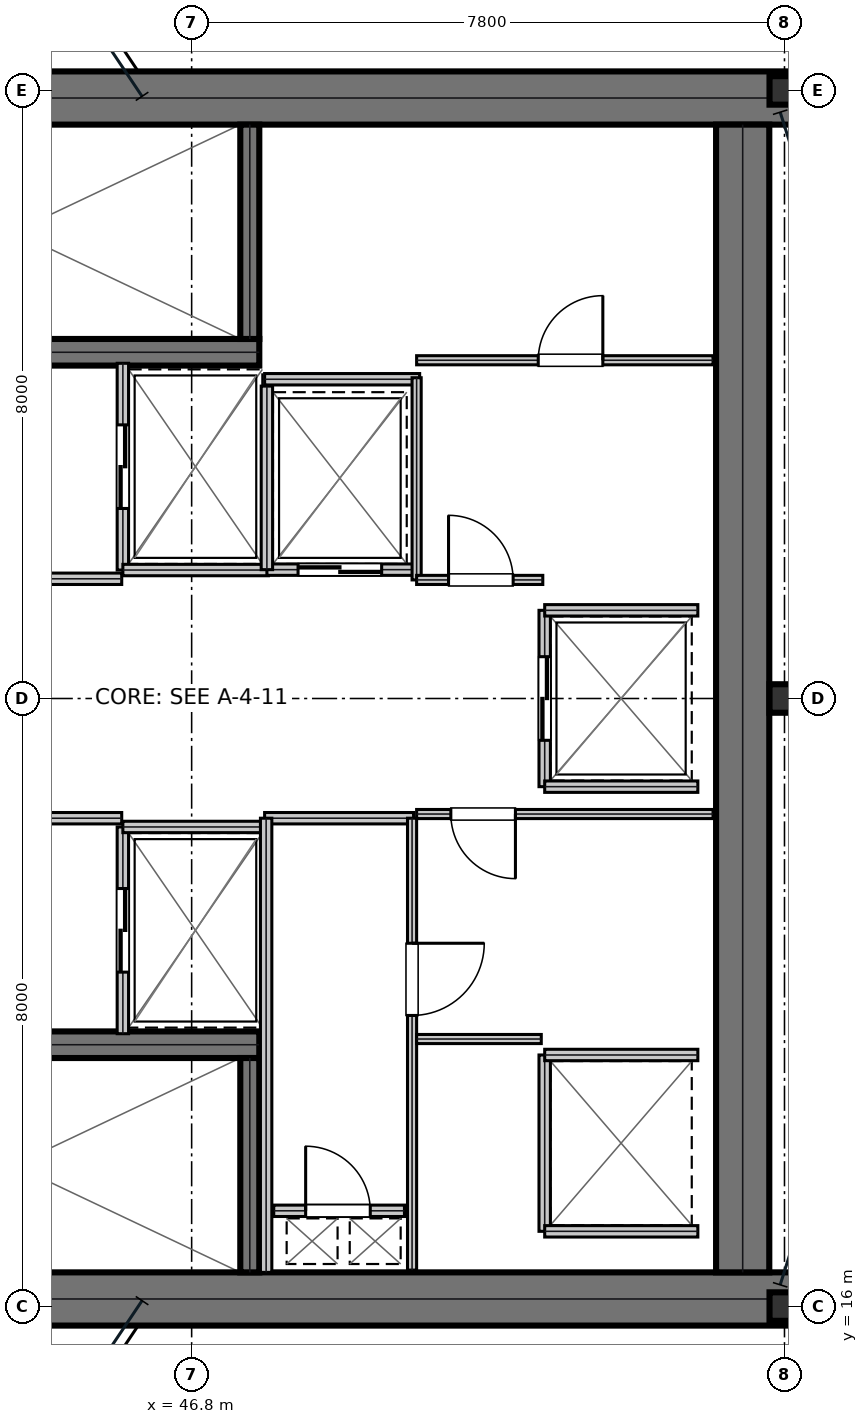
"""IFC4 building model, lengths in metres.
Left out: names, types, materials, properties, quantities, classifications, styles, units other than length and angle.
Written with IfcOpenShell. Run it as: python <this file> out.ifc"""

import sys

from ifc_helpers import new_model, si_unit, direction, frame, frame_2d, origin, origin_2d, place, context, subcontext, project, spatial, rectangle, i_section, extrude, element, fill, save


model = new_model("IFC4")
c1 = context("Model", 3, precision=1e-05, world=origin(), true_north=direction((0.0, 1.0)))
c2 = subcontext(c1, "Body", "Model", "MODEL_VIEW")
j1 = project(units=[si_unit("LENGTHUNIT", "METRE"), si_unit("PLANEANGLEUNIT", "RADIAN")], contexts=[c1])
p1 = place(None, origin())
s1 = spatial("IfcSite", under=j1, at=p1, CompositionType="ELEMENT")
p2 = place(p1, origin())
s2 = spatial("IfcBuilding", under=s1, at=p2, CompositionType="ELEMENT")
p3 = place(p2, frame((0.0, 0.0, 212.1)))
s3 = spatial("IfcBuildingStorey", under=s2, at=p3, CompositionType="ELEMENT", Elevation=212.1)
for number, where, z_axis, x_axis in (
    (1, (38.8, 31.9, 0.0), (0.0, 0.0, 1.0), (1.0, 0.0, 0.0)),
    (2, (38.8, 16.1, 0.0), (0.0, 0.0, 1.0), (1.0, 0.0, 0.0)),
):
    element("IfcWall", number, at=place(p3, frame(where, z_axis=z_axis, x_axis=x_axis)), inside=s3, PredefinedType="SHEAR", context=c2, shape_type="SweptSolid", body=[
        extrude(rectangle(XDim=16.0, YDim=0.7, at=frame_2d((8.0, 0.0))), origin(), (0.0, 0.0, 1.0), 3.79),
    ])
p4 = place(p3, frame((54.05, 16.45, 0.0), z_axis=(0.0, 0.0, 1.0), x_axis=(0.0, 1.0, 0.0)))
e3 = element("IfcWall", 3, at=p4, inside=s3, PredefinedType="SHEAR", context=c2, shape_type="SweptSolid", body=[
    extrude(rectangle(XDim=15.1, YDim=0.7, at=frame_2d((7.55, 0.0))), origin(), (0.0, 0.0, 1.0), 3.79),
])
p5 = place(p3, frame((39.98, 28.555, 0.0), z_axis=(0.0, 0.0, 1.0), x_axis=(1.0, 0.0, 0.0)))
e4 = element("IfcWall", 4, at=p5, inside=s3, PredefinedType="SHEAR", context=c2, shape_type="SweptSolid", body=[
    extrude(rectangle(XDim=7.71, YDim=0.35, at=frame_2d((3.855, 0.0))), origin(), (0.0, 0.0, 1.0), 3.79),
])
p6 = place(p5, frame((0.25, 0.0, 0.0)))
e5 = element("IfcOpeningElement", 5, at=p6, cuts=e4, PredefinedType="OPENING", context=c2, shape_type="SweptSolid", body=[
    extrude(rectangle(XDim=1.1, YDim=2.15, at=frame_2d((0.55, 1.075))), frame((0.0, 0.185, 0.0), z_axis=(0.0, -1.0, 0.0), x_axis=(1.0, 0.0, 0.0)), (0.0, 0.0, 1.0), 0.37),
])
p7 = place(p3, frame((39.98, 19.445, 0.0), z_axis=(0.0, 0.0, 1.0), x_axis=(1.0, 0.0, 0.0)))
e6 = element("IfcWall", 6, at=p7, inside=s3, PredefinedType="SHEAR", context=c2, shape_type="SweptSolid", body=[
    extrude(rectangle(XDim=7.71, YDim=0.35, at=frame_2d((3.855, 0.0))), origin(), (0.0, 0.0, 1.0), 3.79),
])
p8 = place(p7, frame((0.25, 0.0, 0.0)))
e7 = element("IfcOpeningElement", 7, at=p8, cuts=e6, PredefinedType="OPENING", context=c2, shape_type="SweptSolid", body=[
    extrude(rectangle(XDim=1.1, YDim=2.15, at=frame_2d((0.55, 1.075))), frame((0.0, 0.185, 0.0), z_axis=(0.0, -1.0, 0.0), x_axis=(1.0, 0.0, 0.0)), (0.0, 0.0, 1.0), 0.37),
])
for number, where, z_axis, x_axis in (
    (8, (47.565, 28.73, 0.0), (0.0, 0.0, 1.0), (0.0, 1.0, 0.0)),
    (9, (47.565, 16.45, 0.0), (0.0, 0.0, 1.0), (0.0, 1.0, 0.0)),
):
    element("IfcWall", number, at=place(p3, frame(where, z_axis=z_axis, x_axis=x_axis)), inside=s3, PredefinedType="SHEAR", context=c2, shape_type="SweptSolid", body=[
        extrude(rectangle(XDim=2.82, YDim=0.25, at=frame_2d((1.41, 0.0))), origin(), (0.0, 0.0, 1.0), 3.79),
    ])
for number, where, z_axis, x_axis in (
    (10, (54.6, 16.0, 0.0), (0.0, 0.0, 1.0), (1.0, 0.0, 0.0)),
    (11, (54.6, 24.0, 0.0), (0.0, 0.0, 1.0), (1.0, 0.0, 0.0)),
    (12, (54.6, 32.0, 0.0), (0.0, 0.0, 1.0), (1.0, 0.0, 0.0)),
):
    element("IfcColumn", number, at=place(p3, frame(where, z_axis=z_axis, x_axis=x_axis)), inside=s3, PredefinedType="COLUMN", context=c2, shape_type="SweptSolid", body=[
        extrude(i_section(OverallWidth=0.394, OverallDepth=0.375, WebThickness=0.017, FlangeThickness=0.028, at=origin_2d()), origin(), (0.0, 0.0, 1.0), 4.044),
    ])
p9 = place(p3, frame((39.98, 25.575, 0.0), z_axis=(0.0, 0.0, 1.0), x_axis=(1.0, 0.0, 0.0)))
e13 = element("IfcWall", 13, at=p9, inside=s3, PredefinedType="PARTITIONING", context=c2, shape_type="SweptSolid", body=[
    extrude(rectangle(XDim=5.9, YDim=0.15, at=frame_2d((2.95, 0.0))), origin(), (0.0, 0.0, 1.0), 3.79),
])
p10 = place(p9, frame((2.35, 0.0, 0.0)))
e14 = element("IfcOpeningElement", 14, at=p10, cuts=e13, PredefinedType="OPENING", context=c2, shape_type="SweptSolid", body=[
    extrude(rectangle(XDim=1.05, YDim=2.15, at=frame_2d((0.525, 1.075))), frame((0.0, 0.085, 0.0), z_axis=(0.0, -1.0, 0.0), x_axis=(1.0, 0.0, 0.0)), (0.0, 0.0, 1.0), 0.17),
])
p11 = place(p3, frame((39.98, 22.425, 0.0), z_axis=(0.0, 0.0, 1.0), x_axis=(1.0, 0.0, 0.0)))
e15 = element("IfcWall", 15, at=p11, inside=s3, PredefinedType="PARTITIONING", context=c2, shape_type="SweptSolid", body=[
    extrude(rectangle(XDim=5.9, YDim=0.15, at=frame_2d((2.95, 0.0))), origin(), (0.0, 0.0, 1.0), 3.79),
])
p12 = place(p11, frame((2.35, 0.0, 0.0)))
e16 = element("IfcOpeningElement", 16, at=p12, cuts=e15, PredefinedType="OPENING", context=c2, shape_type="SweptSolid", body=[
    extrude(rectangle(XDim=1.05, YDim=2.15, at=frame_2d((0.525, 1.075))), frame((0.0, 0.085, 0.0), z_axis=(0.0, -1.0, 0.0), x_axis=(1.0, 0.0, 0.0)), (0.0, 0.0, 1.0), 0.17),
])
p13 = place(p3, frame((45.895, 25.69, 0.0), z_axis=(0.0, 0.0, 1.0), x_axis=(0.0, 1.0, 0.0)))
e17 = element("IfcWall", 17, at=p13, inside=s3, PredefinedType="PARTITIONING", context=c2, shape_type="SweptSolid", body=[
    extrude(rectangle(XDim=2.72, YDim=0.15, at=frame_2d((1.36, 0.0))), origin(), (0.0, 0.0, 1.0), 3.79),
])
p14 = place(p13, frame((0.81, 0.0, 0.0)))
e18 = element("IfcOpeningElement", 18, at=p14, cuts=e17, PredefinedType="OPENING", context=c2, shape_type="SweptSolid", body=[
    extrude(rectangle(XDim=1.1, YDim=2.15, at=frame_2d((0.55, 1.075))), frame((0.0, 0.085, 0.0), z_axis=(0.0, -1.0, 0.0), x_axis=(1.0, 0.0, 0.0)), (0.0, 0.0, 1.0), 0.17),
])
p15 = place(p3, frame((45.895, 25.69, 0.0), z_axis=(0.0, 0.0, 1.0), x_axis=(1.0, 0.0, 0.0)))
e19 = element("IfcWall", 19, at=p15, inside=s3, PredefinedType="PARTITIONING", context=c2, shape_type="SweptSolid", body=[
    extrude(rectangle(XDim=1.915, YDim=0.15, at=frame_2d((0.958, 0.0))), origin(), (0.0, 0.0, 1.0), 3.79),
])
p16 = place(p3, frame((45.895, 19.59, 0.0), z_axis=(0.0, 0.0, 1.0), x_axis=(0.0, 1.0, 0.0)))
e20 = element("IfcWall", 20, at=p16, inside=s3, PredefinedType="PARTITIONING", context=c2, shape_type="SweptSolid", body=[
    extrude(rectangle(XDim=2.72, YDim=0.15, at=frame_2d((1.36, 0.0))), origin(), (0.0, 0.0, 1.0), 3.79),
])
p17 = place(p16, frame((0.81, 0.0, 0.0)))
e21 = element("IfcOpeningElement", 21, at=p17, cuts=e20, PredefinedType="OPENING", context=c2, shape_type="SweptSolid", body=[
    extrude(rectangle(XDim=1.1, YDim=2.15, at=frame_2d((0.55, 1.075))), frame((0.0, 0.085, 0.0), z_axis=(0.0, -1.0, 0.0), x_axis=(1.0, 0.0, 0.0)), (0.0, 0.0, 1.0), 0.17),
])
p18 = place(p3, frame((45.895, 22.31, 0.0), z_axis=(0.0, 0.0, 1.0), x_axis=(1.0, 0.0, 0.0)))
e22 = element("IfcWall", 22, at=p18, inside=s3, PredefinedType="PARTITIONING", context=c2, shape_type="SweptSolid", body=[
    extrude(rectangle(XDim=1.915, YDim=0.15, at=frame_2d((0.958, 0.0))), origin(), (0.0, 0.0, 1.0), 3.79),
])
p19 = place(p3, frame((47.79, 25.695, 0.0), z_axis=(0.0, 0.0, 1.0), x_axis=(1.0, 0.0, 0.0)))
e23 = element("IfcWall", 23, at=p19, inside=s3, PredefinedType="PARTITIONING", context=c2, shape_type="SweptSolid", body=[
    extrude(rectangle(XDim=1.92, YDim=0.15, at=frame_2d((0.96, 0.0))), origin(), (0.0, 0.0, 1.0), 3.79),
])
p20 = place(p19, frame((0.41, 0.0, 0.0)))
e24 = element("IfcOpeningElement", 24, at=p20, cuts=e23, PredefinedType="OPENING", context=c2, shape_type="SweptSolid", body=[
    extrude(rectangle(XDim=1.1, YDim=2.15, at=frame_2d((0.55, 1.075))), frame((0.0, 0.085, 0.0), z_axis=(0.0, -1.0, 0.0), x_axis=(1.0, 0.0, 0.0)), (0.0, 0.0, 1.0), 0.17),
])
p21 = place(p3, frame((47.79, 25.695, 0.0), z_axis=(0.0, 0.0, 1.0), x_axis=(0.0, 1.0, 0.0)))
e25 = element("IfcWall", 25, at=p21, inside=s3, PredefinedType="PARTITIONING", context=c2, shape_type="SweptSolid", body=[
    extrude(rectangle(XDim=2.415, YDim=0.15, at=frame_2d((1.208, 0.0))), origin(), (0.0, 0.0, 1.0), 3.79),
])
p22 = place(p3, frame((51.445, 22.84, 0.0), z_axis=(0.0, 0.0, 1.0), x_axis=(0.0, 1.0, 0.0)))
e26 = element("IfcWall", 26, at=p22, inside=s3, PredefinedType="PARTITIONING", context=c2, shape_type="SweptSolid", body=[
    extrude(rectangle(XDim=2.32, YDim=0.15, at=frame_2d((1.16, 0.0))), origin(), (0.0, 0.0, 1.0), 3.79),
])
p23 = place(p22, frame((0.61, 0.0, 0.0)))
e27 = element("IfcOpeningElement", 27, at=p23, cuts=e26, PredefinedType="OPENING", context=c2, shape_type="SweptSolid", body=[
    extrude(rectangle(XDim=1.1, YDim=2.15, at=frame_2d((0.55, 1.075))), frame((0.0, 0.085, 0.0), z_axis=(0.0, -1.0, 0.0), x_axis=(1.0, 0.0, 0.0)), (0.0, 0.0, 1.0), 0.17),
])
for number, where, z_axis, x_axis in (
    (28, (51.445, 22.84, 0.0), (0.0, 0.0, 1.0), (1.0, 0.0, 0.0)),
    (29, (51.445, 25.16, 0.0), (0.0, 0.0, 1.0), (1.0, 0.0, 0.0)),
):
    element("IfcWall", number, at=place(p3, frame(where, z_axis=z_axis, x_axis=x_axis)), inside=s3, PredefinedType="PARTITIONING", context=c2, shape_type="SweptSolid", body=[
        extrude(rectangle(XDim=2.015, YDim=0.15, at=frame_2d((1.007, 0.0))), origin(), (0.0, 0.0, 1.0), 3.79),
    ])
p24 = place(p3, frame((51.445, 16.99, 0.0), z_axis=(0.0, 0.0, 1.0), x_axis=(0.0, 1.0, 0.0)))
e30 = element("IfcWall", 30, at=p24, inside=s3, PredefinedType="PARTITIONING", context=c2, shape_type="SweptSolid", body=[
    extrude(rectangle(XDim=2.32, YDim=0.15, at=frame_2d((1.16, 0.0))), origin(), (0.0, 0.0, 1.0), 3.79),
])
for number, where, z_axis, x_axis in (
    (31, (51.445, 16.99, 0.0), (0.0, 0.0, 1.0), (1.0, 0.0, 0.0)),
    (32, (51.445, 19.31, 0.0), (0.0, 0.0, 1.0), (1.0, 0.0, 0.0)),
):
    element("IfcWall", number, at=place(p3, frame(where, z_axis=z_axis, x_axis=x_axis)), inside=s3, PredefinedType="PARTITIONING", context=c2, shape_type="SweptSolid", body=[
        extrude(rectangle(XDim=2.015, YDim=0.15, at=frame_2d((1.007, 0.0))), origin(), (0.0, 0.0, 1.0), 3.79),
    ])
p25 = place(p3, frame((47.88, 17.26, 0.0), z_axis=(0.0, 0.0, 1.0), x_axis=(1.0, 0.0, 0.0)))
e33 = element("IfcWall", 33, at=p25, inside=s3, PredefinedType="PARTITIONING", context=c2, shape_type="SweptSolid", body=[
    extrude(rectangle(XDim=1.72, YDim=0.15, at=frame_2d((0.86, 0.0))), origin(), (0.0, 0.0, 1.0), 3.79),
])
p26 = place(p25, frame((0.42, 0.0, 0.0)))
e34 = element("IfcOpeningElement", 34, at=p26, cuts=e33, PredefinedType="OPENING", context=c2, shape_type="SweptSolid", body=[
    extrude(rectangle(XDim=0.85, YDim=2.15, at=frame_2d((0.425, 1.075))), frame((0.0, 0.085, 0.0), z_axis=(0.0, -1.0, 0.0), x_axis=(1.0, 0.0, 0.0)), (0.0, 0.0, 1.0), 0.17),
])
p27 = place(p3, frame((47.76, 22.425, 0.0), z_axis=(0.0, 0.0, 1.0), x_axis=(1.0, 0.0, 0.0)))
e35 = element("IfcWall", 35, at=p27, inside=s3, PredefinedType="PARTITIONING", context=c2, shape_type="SweptSolid", body=[
    extrude(rectangle(XDim=1.96, YDim=0.15, at=frame_2d((0.98, 0.0))), origin(), (0.0, 0.0, 1.0), 3.79),
])
p28 = place(p3, frame((47.78, 16.45, 0.0), z_axis=(0.0, 0.0, 1.0), x_axis=(0.0, 1.0, 0.0)))
e36 = element("IfcWall", 36, at=p28, inside=s3, PredefinedType="PARTITIONING", context=c2, shape_type="SweptSolid", body=[
    extrude(rectangle(XDim=5.975, YDim=0.15, at=frame_2d((2.988, 0.0))), origin(), (0.0, 0.0, 1.0), 3.79),
])
p29 = place(p3, frame((49.7, 16.48, 0.0), z_axis=(0.0, 0.0, 1.0), x_axis=(0.0, 1.0, 0.0)))
e37 = element("IfcWall", 37, at=p29, inside=s3, PredefinedType="PARTITIONING", context=c2, shape_type="SweptSolid", body=[
    extrude(rectangle(XDim=5.945, YDim=0.12, at=frame_2d((2.973, 0.0))), origin(), (0.0, 0.0, 1.0), 3.79),
])
p30 = place(p29, frame((3.35, 0.0, 0.0)))
e38 = element("IfcOpeningElement", 38, at=p30, cuts=e37, PredefinedType="OPENING", context=c2, shape_type="SweptSolid", body=[
    extrude(rectangle(XDim=0.95, YDim=2.15, at=frame_2d((0.475, 1.075))), frame((0.0, 0.07, 0.0), z_axis=(0.0, -1.0, 0.0), x_axis=(1.0, 0.0, 0.0)), (0.0, 0.0, 1.0), 0.14),
])
p31 = place(p3, frame((49.76, 22.48, 0.0), z_axis=(0.0, 0.0, 1.0), x_axis=(1.0, 0.0, 0.0)))
e39 = element("IfcWall", 39, at=p31, inside=s3, PredefinedType="PARTITIONING", context=c2, shape_type="SweptSolid", body=[
    extrude(rectangle(XDim=3.9, YDim=0.12, at=frame_2d((1.95, 0.0))), origin(), (0.0, 0.0, 1.0), 3.79),
])
p32 = place(p31, frame((0.45, 0.0, 0.0)))
e40 = element("IfcOpeningElement", 40, at=p32, cuts=e39, PredefinedType="OPENING", context=c2, shape_type="SweptSolid", body=[
    extrude(rectangle(XDim=0.85, YDim=2.15, at=frame_2d((0.425, 1.075))), frame((0.0, 0.07, 0.0), z_axis=(0.0, -1.0, 0.0), x_axis=(1.0, 0.0, 0.0)), (0.0, 0.0, 1.0), 0.14),
])
p33 = place(p3, frame((49.76, 19.52, 0.0), z_axis=(0.0, 0.0, 1.0), x_axis=(1.0, 0.0, 0.0)))
e41 = element("IfcWall", 41, at=p33, inside=s3, PredefinedType="PARTITIONING", context=c2, shape_type="SweptSolid", body=[
    extrude(rectangle(XDim=1.64, YDim=0.12, at=frame_2d((0.82, 0.0))), origin(), (0.0, 0.0, 1.0), 3.79),
])
p34 = place(p3, frame((47.76, 28.2, 0.0), z_axis=(0.0, 0.0, 1.0), x_axis=(1.0, 0.0, 0.0)))
e42 = element("IfcWall", 42, at=p34, inside=s3, PredefinedType="PARTITIONING", context=c2, shape_type="SweptSolid", body=[
    extrude(rectangle(XDim=2.04, YDim=0.15, at=frame_2d((1.02, 0.0))), origin(), (0.0, 0.0, 1.0), 3.79),
])
p35 = place(p3, frame((49.76, 25.56, 0.0), z_axis=(0.0, 0.0, 1.0), x_axis=(0.0, 1.0, 0.0)))
e43 = element("IfcWall", 43, at=p35, inside=s3, PredefinedType="PARTITIONING", context=c2, shape_type="SweptSolid", body=[
    extrude(rectangle(XDim=2.66, YDim=0.12, at=frame_2d((1.33, 0.0))), origin(), (0.0, 0.0, 1.0), 3.79),
])
p36 = place(p3, frame((49.76, 25.56, 0.0), z_axis=(0.0, 0.0, 1.0), x_axis=(1.0, 0.0, 0.0)))
e44 = element("IfcWall", 44, at=p36, inside=s3, PredefinedType="PARTITIONING", context=c2, shape_type="SweptSolid", body=[
    extrude(rectangle(XDim=1.66, YDim=0.12, at=frame_2d((0.83, 0.0))), origin(), (0.0, 0.0, 1.0), 3.79),
])
p37 = place(p36, frame((0.42, 0.0, 0.0)))
e45 = element("IfcOpeningElement", 45, at=p37, cuts=e44, PredefinedType="OPENING", context=c2, shape_type="SweptSolid", body=[
    extrude(rectangle(XDim=0.85, YDim=2.15, at=frame_2d((0.425, 1.075))), frame((0.0, 0.07, 0.0), z_axis=(0.0, -1.0, 0.0), x_axis=(1.0, 0.0, 0.0)), (0.0, 0.0, 1.0), 0.14),
])
p38 = place(p3, frame((49.76, 28.45, 0.0), z_axis=(0.0, 0.0, 1.0), x_axis=(1.0, 0.0, 0.0)))
e46 = element("IfcWall", 46, at=p38, inside=s3, PredefinedType="PARTITIONING", context=c2, shape_type="SweptSolid", body=[
    extrude(rectangle(XDim=3.9, YDim=0.12, at=frame_2d((1.95, 0.0))), origin(), (0.0, 0.0, 1.0), 3.79),
])
p39 = place(p38, frame((1.6, 0.0, 0.0)))
e47 = element("IfcOpeningElement", 47, at=p39, cuts=e46, PredefinedType="OPENING", context=c2, shape_type="SweptSolid", body=[
    extrude(rectangle(XDim=0.85, YDim=2.15, at=frame_2d((0.425, 1.075))), frame((0.0, 0.07, 0.0), z_axis=(0.0, -1.0, 0.0), x_axis=(1.0, 0.0, 0.0)), (0.0, 0.0, 1.0), 0.14),
])
p40 = place(p14, frame((1.1, 0.0, 0.0), z_axis=(0.0, 0.0, 1.0), x_axis=(-1.0, 0.0, 0.0)))
e48 = element("IfcDoor", 48, at=p40, inside=s3, OperationType="DOUBLE_DOOR_SLIDING", PredefinedType="DOOR", context=c2, shape_type="SweptSolid", body=[
    extrude(rectangle(XDim=1.1, YDim=2.15, at=frame_2d((0.55, 1.075))), frame((0.0, 0.025, 0.0), z_axis=(0.0, -1.0, 0.0), x_axis=(1.0, 0.0, 0.0)), (0.0, 0.0, 1.0), 0.05),
])
fill(e18, e48)
p41 = place(p17, frame((1.1, 0.0, 0.0), z_axis=(0.0, 0.0, 1.0), x_axis=(-1.0, 0.0, 0.0)))
e49 = element("IfcDoor", 49, at=p41, inside=s3, OperationType="DOUBLE_DOOR_SLIDING", PredefinedType="DOOR", context=c2, shape_type="SweptSolid", body=[
    extrude(rectangle(XDim=1.1, YDim=2.15, at=frame_2d((0.55, 1.075))), frame((0.0, 0.025, 0.0), z_axis=(0.0, -1.0, 0.0), x_axis=(1.0, 0.0, 0.0)), (0.0, 0.0, 1.0), 0.05),
])
fill(e21, e49)
p42 = place(p20, frame((1.1, 0.0, 0.0), z_axis=(0.0, 0.0, 1.0), x_axis=(-1.0, 0.0, 0.0)))
e50 = element("IfcDoor", 50, at=p42, inside=s3, OperationType="DOUBLE_DOOR_SLIDING", PredefinedType="DOOR", context=c2, shape_type="SweptSolid", body=[
    extrude(rectangle(XDim=1.1, YDim=2.15, at=frame_2d((0.55, 1.075))), frame((0.0, 0.025, 0.0), z_axis=(0.0, -1.0, 0.0), x_axis=(1.0, 0.0, 0.0)), (0.0, 0.0, 1.0), 0.05),
])
fill(e24, e50)
p43 = place(p23, frame((1.1, 0.0, 0.0), z_axis=(0.0, 0.0, 1.0), x_axis=(-1.0, 0.0, 0.0)))
e51 = element("IfcDoor", 51, at=p43, inside=s3, OperationType="DOUBLE_DOOR_SLIDING", PredefinedType="DOOR", context=c2, shape_type="SweptSolid", body=[
    extrude(rectangle(XDim=1.1, YDim=2.15, at=frame_2d((0.55, 1.075))), frame((0.0, 0.025, 0.0), z_axis=(0.0, -1.0, 0.0), x_axis=(1.0, 0.0, 0.0)), (0.0, 0.0, 1.0), 0.05),
])
fill(e27, e51)
p44 = place(p26, origin())
e52 = element("IfcDoor", 52, at=p44, inside=s3, OperationType="SINGLE_SWING_LEFT", PredefinedType="TRAPDOOR", context=c2, shape_type="SweptSolid", body=[
    extrude(rectangle(XDim=0.85, YDim=2.15, at=frame_2d((0.425, 1.075))), frame((0.0, 0.025, 0.0), z_axis=(0.0, -1.0, 0.0), x_axis=(1.0, 0.0, 0.0)), (0.0, 0.0, 1.0), 0.05),
])
fill(e34, e52)
p45 = place(p30, frame((0.95, 0.0, 0.0), z_axis=(0.0, 0.0, 1.0), x_axis=(-1.0, 0.0, 0.0)))
e53 = element("IfcDoor", 53, at=p45, inside=s3, OperationType="SINGLE_SWING_LEFT", PredefinedType="DOOR", context=c2, shape_type="SweptSolid", body=[
    extrude(rectangle(XDim=0.95, YDim=2.15, at=frame_2d((0.475, 1.075))), frame((0.0, 0.025, 0.0), z_axis=(0.0, -1.0, 0.0), x_axis=(1.0, 0.0, 0.0)), (0.0, 0.0, 1.0), 0.05),
])
fill(e38, e53)
p46 = place(p32, frame((0.85, 0.0, 0.0), z_axis=(0.0, 0.0, 1.0), x_axis=(-1.0, 0.0, 0.0)))
e54 = element("IfcDoor", 54, at=p46, inside=s3, OperationType="SINGLE_SWING_LEFT", PredefinedType="DOOR", context=c2, shape_type="SweptSolid", body=[
    extrude(rectangle(XDim=0.85, YDim=2.15, at=frame_2d((0.425, 1.075))), frame((0.0, 0.025, 0.0), z_axis=(0.0, -1.0, 0.0), x_axis=(1.0, 0.0, 0.0)), (0.0, 0.0, 1.0), 0.05),
])
fill(e40, e54)
p47 = place(p37, origin())
e55 = element("IfcDoor", 55, at=p47, inside=s3, OperationType="SINGLE_SWING_LEFT", PredefinedType="DOOR", context=c2, shape_type="SweptSolid", body=[
    extrude(rectangle(XDim=0.85, YDim=2.15, at=frame_2d((0.425, 1.075))), frame((0.0, 0.025, 0.0), z_axis=(0.0, -1.0, 0.0), x_axis=(1.0, 0.0, 0.0)), (0.0, 0.0, 1.0), 0.05),
])
fill(e45, e55)
p48 = place(p39, origin())
e56 = element("IfcDoor", 56, at=p48, inside=s3, OperationType="SINGLE_SWING_RIGHT", PredefinedType="DOOR", context=c2, shape_type="SweptSolid", body=[
    extrude(rectangle(XDim=0.85, YDim=2.15, at=frame_2d((0.425, 1.075))), frame((0.0, 0.025, 0.0), z_axis=(0.0, -1.0, 0.0), x_axis=(1.0, 0.0, 0.0)), (0.0, 0.0, 1.0), 0.05),
])
fill(e47, e56)
save(model, sys.argv[1])
